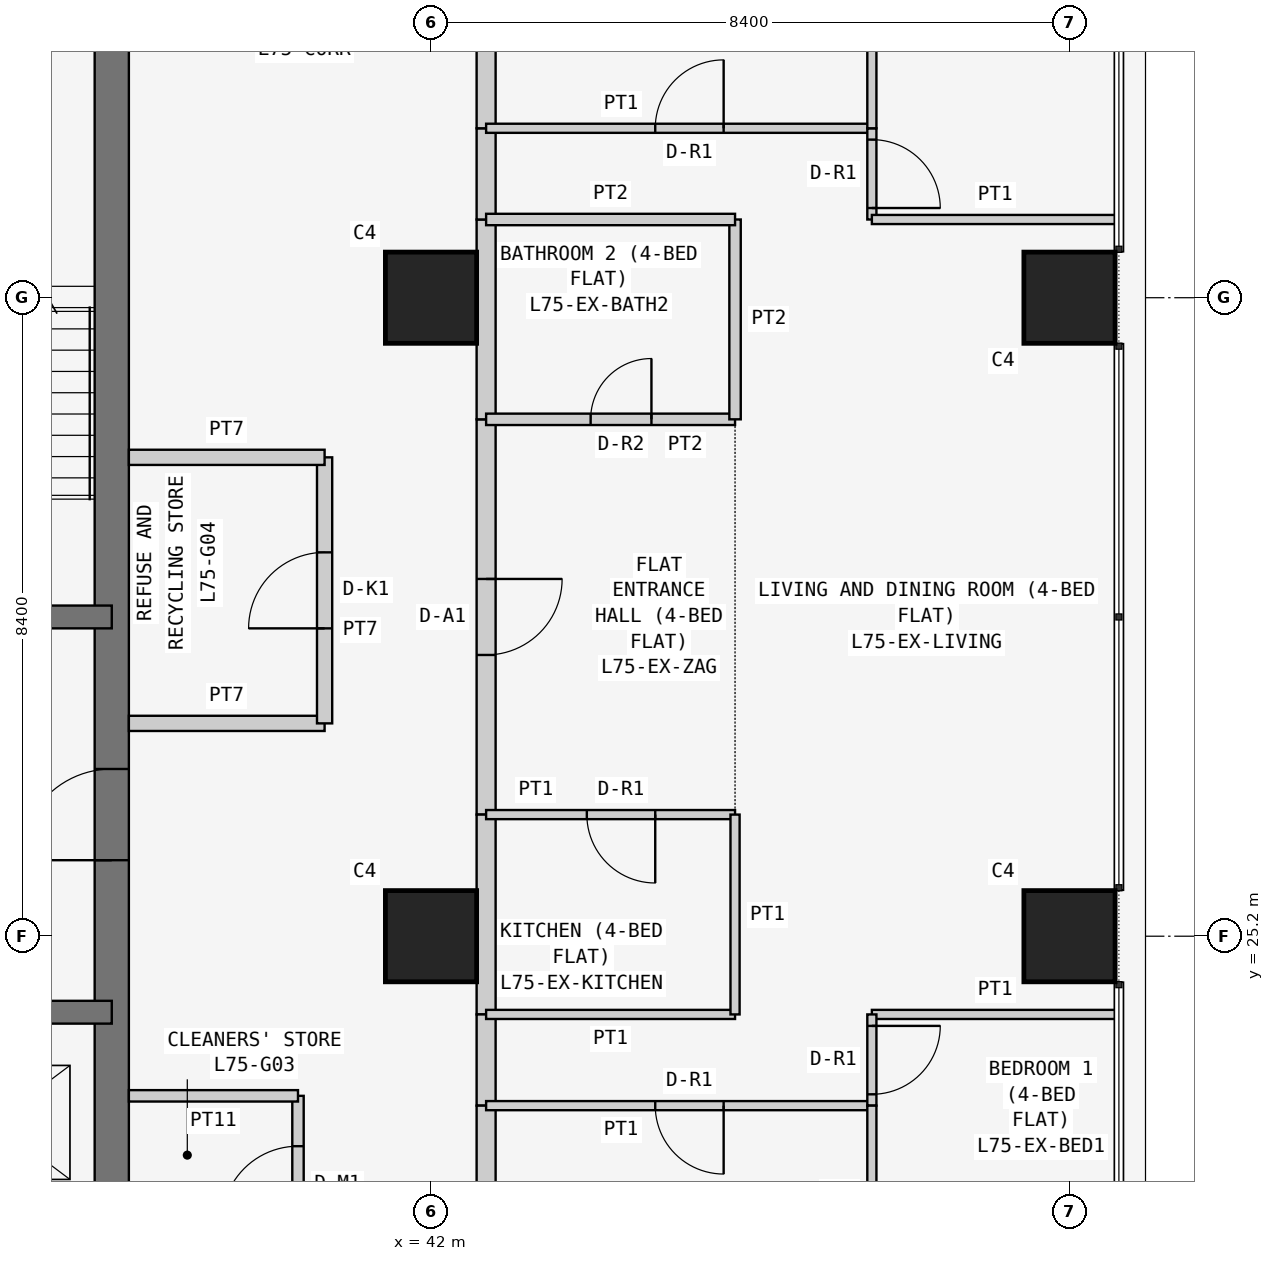
"""IFC4 building model, lengths in metres.
Left out: names, types, materials, properties, quantities, classifications, styles, units other than length and angle.
Written with IfcOpenShell. Run it as: python <this file> out.ifc"""

import sys

from ifc_helpers import new_model, si_unit, direction, frame, frame_2d, origin, origin_2d, place, context, subcontext, project, spatial, rectangle, extrude, element, fill, save


model = new_model("IFC4")
c1 = context("Model", 3, precision=1e-05, world=origin(), true_north=direction((0.0, 1.0)))
c2 = subcontext(c1, "Body", "Model", "MODEL_VIEW")
j1 = project(units=[si_unit("LENGTHUNIT", "METRE"), si_unit("PLANEANGLEUNIT", "RADIAN")], contexts=[c1])
p1 = place(None, origin())
s1 = spatial("IfcSite", under=j1, at=p1, CompositionType="ELEMENT")
p2 = place(p1, origin())
s2 = spatial("IfcBuilding", under=s1, at=p2, CompositionType="ELEMENT")
p3 = place(p2, frame((0.0, 0.0, 286.5)))
s3 = spatial("IfcBuildingStorey", under=s2, at=p3, CompositionType="ELEMENT", Elevation=286.5)
for number, where, z_axis, x_axis in (
    (1, (42.0, 25.2, 0.0), (0.0, 0.0, 1.0), (1.0, 0.0, 0.0)),
    (2, (42.0, 33.6, 0.0), (0.0, 0.0, 1.0), (1.0, 0.0, 0.0)),
    (3, (50.4, 25.2, 0.0), (0.0, 0.0, 1.0), (1.0, 0.0, 0.0)),
    (4, (50.4, 33.6, 0.0), (0.0, 0.0, 1.0), (1.0, 0.0, 0.0)),
):
    element("IfcColumn", number, at=place(p3, frame(where, z_axis=z_axis, x_axis=x_axis)), inside=s3, PredefinedType="COLUMN", context=c2, shape_type="SweptSolid", body=[
        extrude(rectangle(XDim=1.2, YDim=1.2, at=origin_2d()), origin(), (0.0, 0.0, 1.0), 3.6),
    ])
p4 = place(p3, frame((37.8, 21.0, 0.0), z_axis=(0.0, 0.0, 1.0), x_axis=(0.0, 1.0, 0.0)))
e5 = element("IfcWall", 5, at=p4, inside=s3, PredefinedType="SHEAR", context=c2, shape_type="SweptSolid", body=[
    extrude(rectangle(XDim=17.025, YDim=0.45, at=frame_2d((8.512, 0.0))), origin(), (0.0, 0.0, 1.0), 3.6),
])
p5 = place(p4, frame((5.2, 0.0, 0.0)))
e6 = element("IfcOpeningElement", 6, at=p5, cuts=e5, PredefinedType="OPENING", context=c2, shape_type="SweptSolid", body=[
    extrude(rectangle(XDim=1.2, YDim=2.1, at=frame_2d((0.6, 1.05))), frame((0.0, 0.235, 0.0), z_axis=(0.0, -1.0, 0.0), x_axis=(1.0, 0.0, 0.0)), (0.0, 0.0, 1.0), 0.47),
])
p6 = place(p3, frame((26.6, 24.2, 0.0), z_axis=(0.0, 0.0, 1.0), x_axis=(1.0, 0.0, 0.0)))
e7 = element("IfcWall", 7, at=p6, inside=s3, PredefinedType="SHEAR", context=c2, shape_type="SweptSolid", body=[
    extrude(rectangle(XDim=11.2, YDim=0.3, at=frame_2d((5.6, 0.0))), origin(), (0.0, 0.0, 1.0), 3.6),
])
p7 = place(p6, frame((0.913, 0.0, 0.0)))
e8 = element("IfcOpeningElement", 8, at=p7, cuts=e7, PredefinedType="OPENING", context=c2, shape_type="SweptSolid", body=[
    extrude(rectangle(XDim=1.0, YDim=2.1, at=frame_2d((0.5, 1.05))), frame((0.0, 0.16, 0.0), z_axis=(0.0, -1.0, 0.0), x_axis=(1.0, 0.0, 0.0)), (0.0, 0.0, 1.0), 0.32),
])
p8 = place(p6, frame((3.7, 0.0, 0.0)))
e9 = element("IfcOpeningElement", 9, at=p8, cuts=e7, PredefinedType="OPENING", context=c2, shape_type="SweptSolid", body=[
    extrude(rectangle(XDim=1.0, YDim=2.1, at=frame_2d((0.5, 1.05))), frame((0.0, 0.16, 0.0), z_axis=(0.0, -1.0, 0.0), x_axis=(1.0, 0.0, 0.0)), (0.0, 0.0, 1.0), 0.32),
])
p9 = place(p6, frame((6.5, 0.0, 0.0)))
e10 = element("IfcOpeningElement", 10, at=p9, cuts=e7, PredefinedType="OPENING", context=c2, shape_type="SweptSolid", body=[
    extrude(rectangle(XDim=1.0, YDim=2.1, at=frame_2d((0.5, 1.05))), frame((0.0, 0.16, 0.0), z_axis=(0.0, -1.0, 0.0), x_axis=(1.0, 0.0, 0.0)), (0.0, 0.0, 1.0), 0.32),
])
p10 = place(p6, frame((9.1, 0.0, 0.0)))
e11 = element("IfcOpeningElement", 11, at=p10, cuts=e7, PredefinedType="OPENING", context=c2, shape_type="SweptSolid", body=[
    extrude(rectangle(XDim=1.1, YDim=2.1, at=frame_2d((0.55, 1.05))), frame((0.0, 0.16, 0.0), z_axis=(0.0, -1.0, 0.0), x_axis=(1.0, 0.0, 0.0)), (0.0, 0.0, 1.0), 0.32),
])
p11 = place(p3, frame((32.2, 29.4, 0.0), z_axis=(0.0, 0.0, 1.0), x_axis=(1.0, 0.0, 0.0)))
e12 = element("IfcWall", 12, at=p11, inside=s3, PredefinedType="SHEAR", context=c2, shape_type="SweptSolid", body=[
    extrude(rectangle(XDim=5.6, YDim=0.3, at=frame_2d((2.8, 0.0))), origin(), (0.0, 0.0, 1.0), 3.6),
])
p12 = place(p11, frame((2.0, 0.0, 0.0)))
e13 = element("IfcOpeningElement", 13, at=p12, cuts=e12, PredefinedType="OPENING", context=c2, shape_type="SweptSolid", body=[
    extrude(rectangle(XDim=1.2, YDim=2.1, at=frame_2d((0.6, 1.05))), frame((0.0, 0.16, 0.0), z_axis=(0.0, -1.0, 0.0), x_axis=(1.0, 0.0, 0.0)), (0.0, 0.0, 1.0), 0.32),
])
p13 = place(p3, frame((40.25, 20.775, 0.0), z_axis=(0.0, 0.0, 1.0), x_axis=(0.0, 1.0, 0.0)))
e14 = element("IfcWall", 14, at=p13, inside=s3, PredefinedType="PARTITIONING", context=c2, shape_type="SweptSolid", body=[
    extrude(rectangle(XDim=2.325, YDim=0.15, at=frame_2d((1.163, 0.0))), origin(), (0.0, 0.0, 1.0), 3.45),
])
p14 = place(p13, frame((0.663, 0.0, 0.0)))
e15 = element("IfcOpeningElement", 15, at=p14, cuts=e14, PredefinedType="OPENING", context=c2, shape_type="SweptSolid", body=[
    extrude(rectangle(XDim=1.0, YDim=2.1, at=frame_2d((0.5, 1.05))), frame((0.0, 0.085, 0.0), z_axis=(0.0, -1.0, 0.0), x_axis=(1.0, 0.0, 0.0)), (0.0, 0.0, 1.0), 0.17),
])
p15 = place(p3, frame((40.25, 23.1, 0.0), z_axis=(0.0, 0.0, 1.0), x_axis=(-1.0, 0.0, 0.0)))
e16 = element("IfcWall", 16, at=p15, inside=s3, PredefinedType="PARTITIONING", context=c2, shape_type="SweptSolid", body=[
    extrude(rectangle(XDim=2.225, YDim=0.15, at=frame_2d((1.113, 0.0))), origin(), (0.0, 0.0, 1.0), 3.45),
])
p16 = place(p3, frame((38.025, 28.0, 0.0), z_axis=(0.0, 0.0, 1.0), x_axis=(1.0, 0.0, 0.0)))
e17 = element("IfcWall", 17, at=p16, inside=s3, PredefinedType="PARTITIONING", context=c2, shape_type="SweptSolid", body=[
    extrude(rectangle(XDim=2.575, YDim=0.2, at=frame_2d((1.288, 0.0))), origin(), (0.0, 0.0, 1.0), 3.45),
])
p17 = place(p3, frame((40.6, 28.0, 0.0), z_axis=(0.0, 0.0, 1.0), x_axis=(0.0, 1.0, 0.0)))
e18 = element("IfcWall", 18, at=p17, inside=s3, PredefinedType="PARTITIONING", context=c2, shape_type="SweptSolid", body=[
    extrude(rectangle(XDim=3.5, YDim=0.2, at=frame_2d((1.75, 0.0))), origin(), (0.0, 0.0, 1.0), 3.45),
])
p18 = place(p17, frame((1.25, 0.0, 0.0)))
e19 = element("IfcOpeningElement", 19, at=p18, cuts=e18, PredefinedType="OPENING", context=c2, shape_type="SweptSolid", body=[
    extrude(rectangle(XDim=1.0, YDim=2.1, at=frame_2d((0.5, 1.05))), frame((0.0, 0.11, 0.0), z_axis=(0.0, -1.0, 0.0), x_axis=(1.0, 0.0, 0.0)), (0.0, 0.0, 1.0), 0.22),
])
p19 = place(p3, frame((40.6, 31.5, 0.0), z_axis=(0.0, 0.0, 1.0), x_axis=(-1.0, 0.0, 0.0)))
e20 = element("IfcWall", 20, at=p19, inside=s3, PredefinedType="PARTITIONING", context=c2, shape_type="SweptSolid", body=[
    extrude(rectangle(XDim=2.575, YDim=0.2, at=frame_2d((1.288, 0.0))), origin(), (0.0, 0.0, 1.0), 3.45),
])
p20 = place(p3, frame((42.725, 32.0, 0.0), z_axis=(0.0, 0.0, 1.0), x_axis=(0.0, -1.0, 0.0)))
e21 = element("IfcWall", 21, at=p20, inside=s3, PredefinedType="PARTITIONING", context=c2, shape_type="SweptSolid", body=[
    extrude(rectangle(XDim=5.2, YDim=0.25, at=frame_2d((2.6, 0.0))), origin(), (0.0, 0.0, 1.0), 3.45),
])
p21 = place(p20, frame((2.1, 0.0, 0.0)))
e22 = element("IfcOpeningElement", 22, at=p21, cuts=e21, PredefinedType="OPENING", context=c2, shape_type="SweptSolid", body=[
    extrude(rectangle(XDim=1.0, YDim=2.1, at=frame_2d((0.5, 1.05))), frame((0.0, 0.135, 0.0), z_axis=(0.0, -1.0, 0.0), x_axis=(1.0, 0.0, 0.0)), (0.0, 0.0, 1.0), 0.27),
])
p22 = place(p3, frame((42.725, 34.629, 0.0), z_axis=(0.0, 0.0, 1.0), x_axis=(0.0, -1.0, 0.0)))
e23 = element("IfcWall", 23, at=p22, inside=s3, PredefinedType="PARTITIONING", context=c2, shape_type="SweptSolid", body=[
    extrude(rectangle(XDim=2.629, YDim=0.25, at=frame_2d((1.314, 0.0))), origin(), (0.0, 0.0, 1.0), 3.45),
])
p23 = place(p3, frame((42.725, 26.8, 0.0), z_axis=(0.0, 0.0, 1.0), x_axis=(0.0, -1.0, 0.0)))
e24 = element("IfcWall", 24, at=p23, inside=s3, PredefinedType="PARTITIONING", context=c2, shape_type="SweptSolid", body=[
    extrude(rectangle(XDim=2.629, YDim=0.25, at=frame_2d((1.314, 0.0))), origin(), (0.0, 0.0, 1.0), 3.45),
])
p24 = place(p3, frame((42.725, 24.171, 0.0), z_axis=(0.0, 0.0, 1.0), x_axis=(0.0, -1.0, 0.0)))
e25 = element("IfcWall", 25, at=p24, inside=s3, PredefinedType="PARTITIONING", context=c2, shape_type="SweptSolid", body=[
    extrude(rectangle(XDim=1.2, YDim=0.25, at=frame_2d((0.6, 0.0))), origin(), (0.0, 0.0, 1.0), 3.45),
])
p25 = place(p3, frame((42.725, 35.829, 0.0), z_axis=(0.0, 0.0, 1.0), x_axis=(0.0, -1.0, 0.0)))
e26 = element("IfcWall", 26, at=p25, inside=s3, PredefinedType="PARTITIONING", context=c2, shape_type="SweptSolid", body=[
    extrude(rectangle(XDim=1.2, YDim=0.25, at=frame_2d((0.6, 0.0))), origin(), (0.0, 0.0, 1.0), 3.45),
])
for number, where, z_axis, x_axis in (
    (27, (42.725, 42.7, 0.0), (0.0, 0.0, 1.0), (0.0, -1.0, 0.0)),
    (28, (42.725, 22.971, 0.0), (0.0, 0.0, 1.0), (0.0, -1.0, 0.0)),
):
    element("IfcWall", number, at=place(p3, frame(where, z_axis=z_axis, x_axis=x_axis)), inside=s3, PredefinedType="PARTITIONING", context=c2, shape_type="SweptSolid", body=[
        extrude(rectangle(XDim=6.871, YDim=0.25, at=frame_2d((3.436, 0.0))), origin(), (0.0, 0.0, 1.0), 3.45),
    ])
p26 = place(p3, frame((46.0, 32.0, 0.0), z_axis=(0.0, 0.0, 1.0), x_axis=(-1.0, 0.0, 0.0)))
e29 = element("IfcWall", 29, at=p26, inside=s3, PredefinedType="PARTITIONING", context=c2, shape_type="SweptSolid", body=[
    extrude(rectangle(XDim=3.275, YDim=0.15, at=frame_2d((1.637, 0.0))), origin(), (0.0, 0.0, 1.0), 3.45),
])
p27 = place(p26, frame((1.1, 0.0, 0.0)))
e30 = element("IfcOpeningElement", 30, at=p27, cuts=e29, PredefinedType="OPENING", context=c2, shape_type="SweptSolid", body=[
    extrude(rectangle(XDim=0.8, YDim=2.1, at=frame_2d((0.4, 1.05))), frame((0.0, 0.085, 0.0), z_axis=(0.0, -1.0, 0.0), x_axis=(1.0, 0.0, 0.0)), (0.0, 0.0, 1.0), 0.17),
])
p28 = place(p3, frame((42.725, 26.8, 0.0), z_axis=(0.0, 0.0, 1.0), x_axis=(1.0, 0.0, 0.0)))
e31 = element("IfcWall", 31, at=p28, inside=s3, PredefinedType="PARTITIONING", context=c2, shape_type="SweptSolid", body=[
    extrude(rectangle(XDim=3.275, YDim=0.12, at=frame_2d((1.637, 0.0))), origin(), (0.0, 0.0, 1.0), 3.45),
])
p29 = place(p28, frame((1.325, 0.0, 0.0)))
e32 = element("IfcOpeningElement", 32, at=p29, cuts=e31, PredefinedType="OPENING", context=c2, shape_type="SweptSolid", body=[
    extrude(rectangle(XDim=0.9, YDim=2.1, at=frame_2d((0.45, 1.05))), frame((0.0, 0.07, 0.0), z_axis=(0.0, -1.0, 0.0), x_axis=(1.0, 0.0, 0.0)), (0.0, 0.0, 1.0), 0.14),
])
p30 = place(p3, frame((46.0, 32.0, 0.0), z_axis=(0.0, 0.0, 1.0), x_axis=(0.0, 1.0, 0.0)))
e33 = element("IfcWall", 33, at=p30, inside=s3, PredefinedType="PARTITIONING", context=c2, shape_type="SweptSolid", body=[
    extrude(rectangle(XDim=2.629, YDim=0.15, at=frame_2d((1.314, 0.0))), origin(), (0.0, 0.0, 1.0), 3.45),
])
p31 = place(p3, frame((46.0, 34.629, 0.0), z_axis=(0.0, 0.0, 1.0), x_axis=(-1.0, 0.0, 0.0)))
e34 = element("IfcWall", 34, at=p31, inside=s3, PredefinedType="PARTITIONING", context=c2, shape_type="SweptSolid", body=[
    extrude(rectangle(XDim=3.275, YDim=0.15, at=frame_2d((1.637, 0.0))), origin(), (0.0, 0.0, 1.0), 3.45),
])
p32 = place(p3, frame((42.725, 24.171, 0.0), z_axis=(0.0, 0.0, 1.0), x_axis=(1.0, 0.0, 0.0)))
e35 = element("IfcWall", 35, at=p32, inside=s3, PredefinedType="PARTITIONING", context=c2, shape_type="SweptSolid", body=[
    extrude(rectangle(XDim=3.275, YDim=0.12, at=frame_2d((1.637, 0.0))), origin(), (0.0, 0.0, 1.0), 3.45),
])
p33 = place(p3, frame((46.0, 24.171, 0.0), z_axis=(0.0, 0.0, 1.0), x_axis=(0.0, 1.0, 0.0)))
e36 = element("IfcWall", 36, at=p33, inside=s3, PredefinedType="PARTITIONING", context=c2, shape_type="SweptSolid", body=[
    extrude(rectangle(XDim=2.629, YDim=0.12, at=frame_2d((1.314, 0.0))), origin(), (0.0, 0.0, 1.0), 3.45),
])
p34 = place(p3, frame((42.725, 35.829, 0.0), z_axis=(0.0, 0.0, 1.0), x_axis=(1.0, 0.0, 0.0)))
e37 = element("IfcWall", 37, at=p34, inside=s3, PredefinedType="PARTITIONING", context=c2, shape_type="SweptSolid", body=[
    extrude(rectangle(XDim=5.075, YDim=0.12, at=frame_2d((2.538, 0.0))), origin(), (0.0, 0.0, 1.0), 3.45),
])
p35 = place(p34, frame((2.225, 0.0, 0.0)))
e38 = element("IfcOpeningElement", 38, at=p35, cuts=e37, PredefinedType="OPENING", context=c2, shape_type="SweptSolid", body=[
    extrude(rectangle(XDim=0.9, YDim=2.1, at=frame_2d((0.45, 1.05))), frame((0.0, 0.07, 0.0), z_axis=(0.0, -1.0, 0.0), x_axis=(1.0, 0.0, 0.0)), (0.0, 0.0, 1.0), 0.14),
])
p36 = place(p3, frame((47.8, 35.829, 0.0), z_axis=(0.0, 0.0, 1.0), x_axis=(0.0, -1.0, 0.0)))
e39 = element("IfcWall", 39, at=p36, inside=s3, PredefinedType="PARTITIONING", context=c2, shape_type="SweptSolid", body=[
    extrude(rectangle(XDim=1.2, YDim=0.12, at=frame_2d((0.6, 0.0))), origin(), (0.0, 0.0, 1.0), 3.45),
])
p37 = place(p36, frame((0.149, 0.0, 0.0)))
e40 = element("IfcOpeningElement", 40, at=p37, cuts=e39, PredefinedType="OPENING", context=c2, shape_type="SweptSolid", body=[
    extrude(rectangle(XDim=0.9, YDim=2.1, at=frame_2d((0.45, 1.05))), frame((0.0, 0.07, 0.0), z_axis=(0.0, -1.0, 0.0), x_axis=(1.0, 0.0, 0.0)), (0.0, 0.0, 1.0), 0.14),
])
p38 = place(p3, frame((47.8, 34.629, 0.0), z_axis=(0.0, 0.0, 1.0), x_axis=(1.0, 0.0, 0.0)))
e41 = element("IfcWall", 41, at=p38, inside=s3, PredefinedType="PARTITIONING", context=c2, shape_type="SweptSolid", body=[
    extrude(rectangle(XDim=3.25, YDim=0.12, at=frame_2d((1.625, 0.0))), origin(), (0.0, 0.0, 1.0), 3.45),
])
p39 = place(p3, frame((47.8, 22.971, 0.0), z_axis=(0.0, 0.0, 1.0), x_axis=(-1.0, 0.0, 0.0)))
e42 = element("IfcWall", 42, at=p39, inside=s3, PredefinedType="PARTITIONING", context=c2, shape_type="SweptSolid", body=[
    extrude(rectangle(XDim=5.075, YDim=0.12, at=frame_2d((2.538, 0.0))), origin(), (0.0, 0.0, 1.0), 3.45),
])
p40 = place(p39, frame((1.95, 0.0, 0.0)))
e43 = element("IfcOpeningElement", 43, at=p40, cuts=e42, PredefinedType="OPENING", context=c2, shape_type="SweptSolid", body=[
    extrude(rectangle(XDim=0.9, YDim=2.1, at=frame_2d((0.45, 1.05))), frame((0.0, 0.07, 0.0), z_axis=(0.0, -1.0, 0.0), x_axis=(1.0, 0.0, 0.0)), (0.0, 0.0, 1.0), 0.14),
])
p41 = place(p3, frame((51.05, 24.171, 0.0), z_axis=(0.0, 0.0, 1.0), x_axis=(-1.0, 0.0, 0.0)))
e44 = element("IfcWall", 44, at=p41, inside=s3, PredefinedType="PARTITIONING", context=c2, shape_type="SweptSolid", body=[
    extrude(rectangle(XDim=3.25, YDim=0.12, at=frame_2d((1.625, 0.0))), origin(), (0.0, 0.0, 1.0), 3.45),
])
p42 = place(p3, frame((47.8, 24.171, 0.0), z_axis=(0.0, 0.0, 1.0), x_axis=(0.0, -1.0, 0.0)))
e45 = element("IfcWall", 45, at=p42, inside=s3, PredefinedType="PARTITIONING", context=c2, shape_type="SweptSolid", body=[
    extrude(rectangle(XDim=1.2, YDim=0.12, at=frame_2d((0.6, 0.0))), origin(), (0.0, 0.0, 1.0), 3.45),
])
p43 = place(p42, frame((0.151, 0.0, 0.0)))
e46 = element("IfcOpeningElement", 46, at=p43, cuts=e45, PredefinedType="OPENING", context=c2, shape_type="SweptSolid", body=[
    extrude(rectangle(XDim=0.9, YDim=2.1, at=frame_2d((0.45, 1.05))), frame((0.0, 0.07, 0.0), z_axis=(0.0, -1.0, 0.0), x_axis=(1.0, 0.0, 0.0)), (0.0, 0.0, 1.0), 0.14),
])
p44 = place(p3, frame((47.8, 35.829, 0.0), z_axis=(0.0, 0.0, 1.0), x_axis=(0.0, 1.0, 0.0)))
e47 = element("IfcWall", 47, at=p44, inside=s3, PredefinedType="PARTITIONING", context=c2, shape_type="SweptSolid", body=[
    extrude(rectangle(XDim=6.871, YDim=0.12, at=frame_2d((3.436, 0.0))), origin(), (0.0, 0.0, 1.0), 3.45),
])
p45 = place(p3, frame((47.8, 20.686, 0.0), z_axis=(0.0, 0.0, 1.0), x_axis=(0.0, 1.0, 0.0)))
e48 = element("IfcWall", 48, at=p45, inside=s3, PredefinedType="PARTITIONING", context=c2, shape_type="SweptSolid", body=[
    extrude(rectangle(XDim=2.285, YDim=0.12, at=frame_2d((1.143, 0.0))), origin(), (0.0, 0.0, 1.0), 3.45),
])
p46 = place(p14, origin())
e49 = element("IfcDoor", 49, at=p46, inside=s3, OperationType="SINGLE_SWING_LEFT", PredefinedType="DOOR", context=c2, shape_type="SweptSolid", body=[
    extrude(rectangle(XDim=1.0, YDim=2.1, at=frame_2d((0.5, 1.05))), frame((0.0, 0.025, 0.0), z_axis=(0.0, -1.0, 0.0), x_axis=(1.0, 0.0, 0.0)), (0.0, 0.0, 1.0), 0.05),
])
fill(e15, e49)
p47 = place(p18, origin())
e50 = element("IfcDoor", 50, at=p47, inside=s3, OperationType="SINGLE_SWING_LEFT", PredefinedType="DOOR", context=c2, shape_type="SweptSolid", body=[
    extrude(rectangle(XDim=1.0, YDim=2.1, at=frame_2d((0.5, 1.05))), frame((0.0, 0.025, 0.0), z_axis=(0.0, -1.0, 0.0), x_axis=(1.0, 0.0, 0.0)), (0.0, 0.0, 1.0), 0.05),
])
fill(e19, e50)
p48 = place(p21, origin())
e51 = element("IfcDoor", 51, at=p48, inside=s3, OperationType="SINGLE_SWING_LEFT", PredefinedType="DOOR", context=c2, shape_type="SweptSolid", body=[
    extrude(rectangle(XDim=1.0, YDim=2.1, at=frame_2d((0.5, 1.05))), frame((0.0, 0.025, 0.0), z_axis=(0.0, -1.0, 0.0), x_axis=(1.0, 0.0, 0.0)), (0.0, 0.0, 1.0), 0.05),
])
fill(e22, e51)
p49 = place(p27, frame((0.8, 0.0, 0.0), z_axis=(0.0, 0.0, 1.0), x_axis=(-1.0, 0.0, 0.0)))
e52 = element("IfcDoor", 52, at=p49, inside=s3, OperationType="SINGLE_SWING_RIGHT", PredefinedType="DOOR", context=c2, shape_type="SweptSolid", body=[
    extrude(rectangle(XDim=0.8, YDim=2.1, at=frame_2d((0.4, 1.05))), frame((0.0, 0.025, 0.0), z_axis=(0.0, -1.0, 0.0), x_axis=(1.0, 0.0, 0.0)), (0.0, 0.0, 1.0), 0.05),
])
fill(e30, e52)
p50 = place(p29, frame((0.9, 0.0, 0.0), z_axis=(0.0, 0.0, 1.0), x_axis=(-1.0, 0.0, 0.0)))
e53 = element("IfcDoor", 53, at=p50, inside=s3, OperationType="SINGLE_SWING_LEFT", PredefinedType="DOOR", context=c2, shape_type="SweptSolid", body=[
    extrude(rectangle(XDim=0.9, YDim=2.1, at=frame_2d((0.45, 1.05))), frame((0.0, 0.025, 0.0), z_axis=(0.0, -1.0, 0.0), x_axis=(1.0, 0.0, 0.0)), (0.0, 0.0, 1.0), 0.05),
])
fill(e32, e53)
p51 = place(p35, origin())
e54 = element("IfcDoor", 54, at=p51, inside=s3, OperationType="SINGLE_SWING_RIGHT", PredefinedType="DOOR", context=c2, shape_type="SweptSolid", body=[
    extrude(rectangle(XDim=0.9, YDim=2.1, at=frame_2d((0.45, 1.05))), frame((0.0, 0.025, 0.0), z_axis=(0.0, -1.0, 0.0), x_axis=(1.0, 0.0, 0.0)), (0.0, 0.0, 1.0), 0.05),
])
fill(e38, e54)
p52 = place(p37, origin())
e55 = element("IfcDoor", 55, at=p52, inside=s3, OperationType="SINGLE_SWING_RIGHT", PredefinedType="DOOR", context=c2, shape_type="SweptSolid", body=[
    extrude(rectangle(XDim=0.9, YDim=2.1, at=frame_2d((0.45, 1.05))), frame((0.0, 0.025, 0.0), z_axis=(0.0, -1.0, 0.0), x_axis=(1.0, 0.0, 0.0)), (0.0, 0.0, 1.0), 0.05),
])
fill(e40, e55)
p53 = place(p40, origin())
e56 = element("IfcDoor", 56, at=p53, inside=s3, OperationType="SINGLE_SWING_LEFT", PredefinedType="DOOR", context=c2, shape_type="SweptSolid", body=[
    extrude(rectangle(XDim=0.9, YDim=2.1, at=frame_2d((0.45, 1.05))), frame((0.0, 0.025, 0.0), z_axis=(0.0, -1.0, 0.0), x_axis=(1.0, 0.0, 0.0)), (0.0, 0.0, 1.0), 0.05),
])
fill(e43, e56)
p54 = place(p43, origin())
e57 = element("IfcDoor", 57, at=p54, inside=s3, OperationType="SINGLE_SWING_LEFT", PredefinedType="DOOR", context=c2, shape_type="SweptSolid", body=[
    extrude(rectangle(XDim=0.9, YDim=2.1, at=frame_2d((0.45, 1.05))), frame((0.0, 0.025, 0.0), z_axis=(0.0, -1.0, 0.0), x_axis=(1.0, 0.0, 0.0)), (0.0, 0.0, 1.0), 0.05),
])
fill(e46, e57)
p55 = place(p5, origin())
e58 = element("IfcDoor", 58, at=p55, inside=s3, OperationType="SINGLE_SWING_LEFT", PredefinedType="DOOR", context=c2, shape_type="SweptSolid", body=[
    extrude(rectangle(XDim=1.2, YDim=2.1, at=frame_2d((0.6, 1.05))), frame((0.0, 0.025, 0.0), z_axis=(0.0, -1.0, 0.0), x_axis=(1.0, 0.0, 0.0)), (0.0, 0.0, 1.0), 0.05),
])
fill(e6, e58)
save(model, sys.argv[1])
